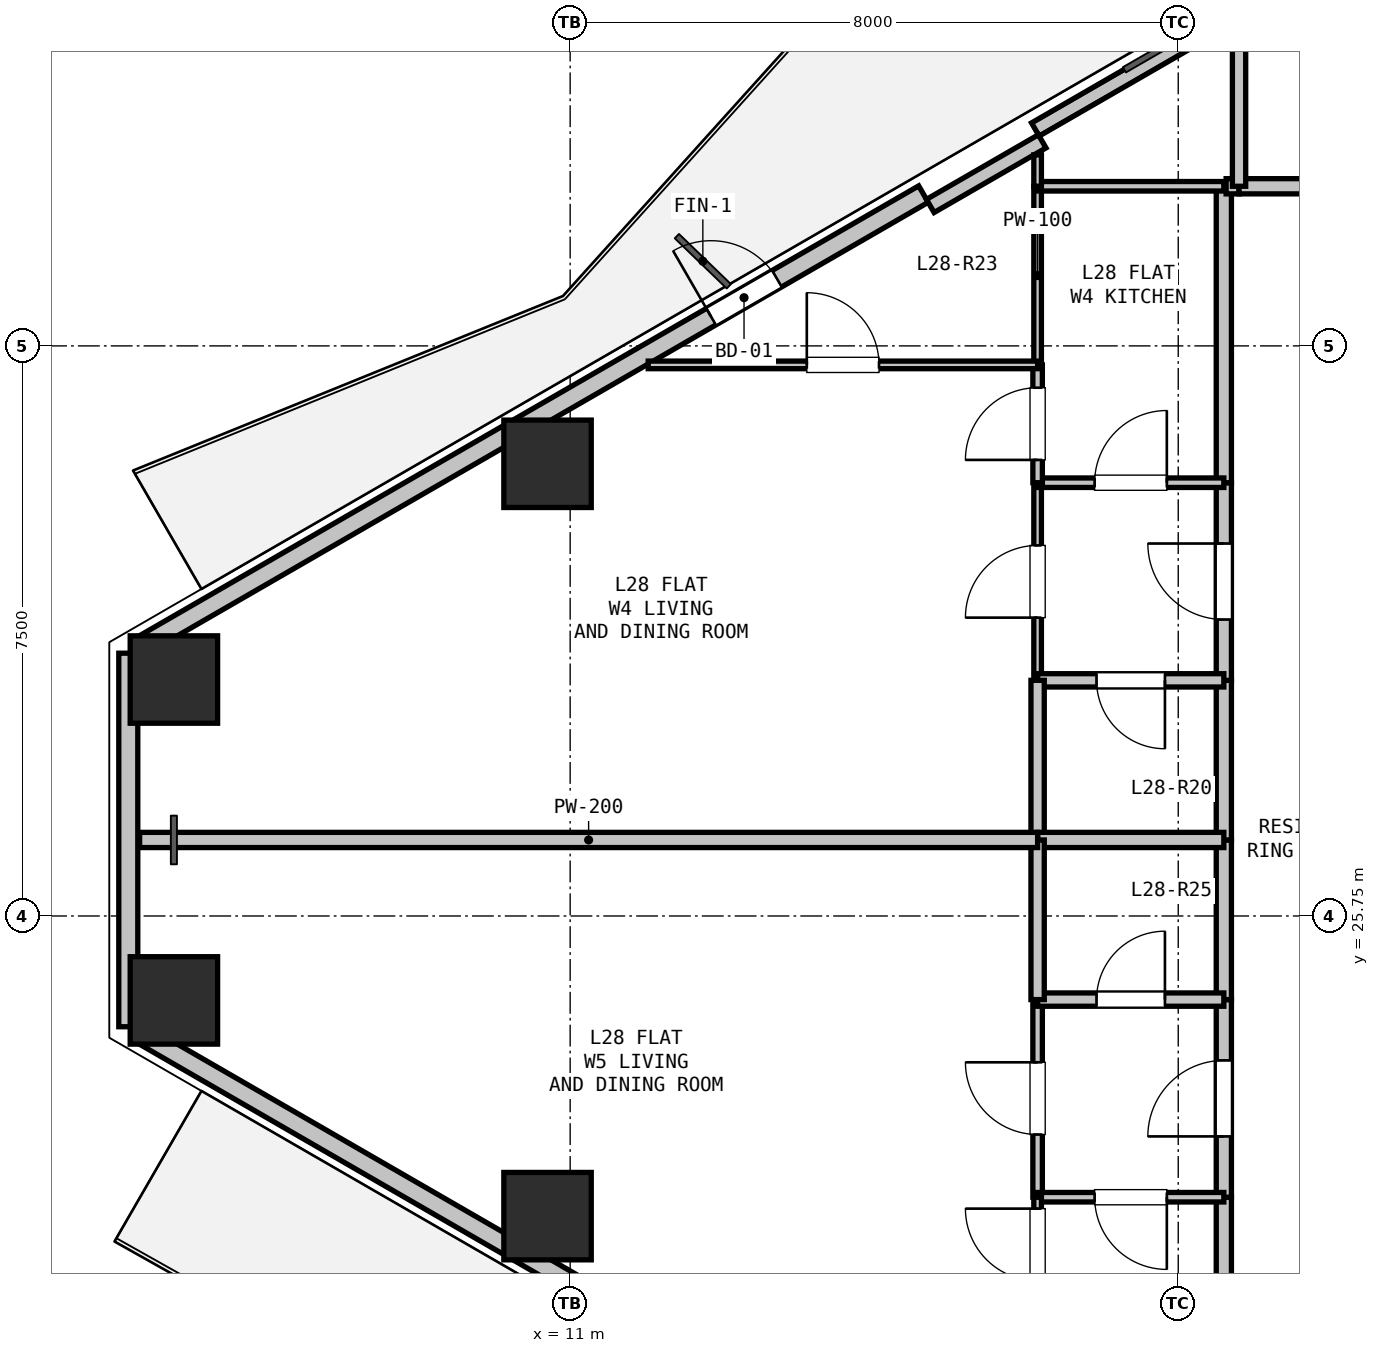
"""IFC4 building model, lengths in metres.
Left out: names, types, materials, properties, quantities, classifications, styles, units other than length and angle.
Written with IfcOpenShell. Run it as: python <this file> out.ifc"""

import sys

from ifc_helpers import new_model, si_unit, direction, frame, frame_2d, origin, origin_2d, place, context, subcontext, project, spatial, rectangle, hollow_rectangle, extrude, element, fill, save


model = new_model("IFC4")
c1 = context("Model", 3, precision=1e-05, world=origin(), true_north=direction((0.0, 1.0)))
c2 = subcontext(c1, "Body", "Model", "MODEL_VIEW")
j1 = project(units=[si_unit("LENGTHUNIT", "METRE"), si_unit("PLANEANGLEUNIT", "RADIAN")], contexts=[c1])
p1 = place(None, origin())
s1 = spatial("IfcSite", under=j1, at=p1, CompositionType="ELEMENT")
p2 = place(p1, origin())
s2 = spatial("IfcBuilding", under=s1, at=p2, CompositionType="ELEMENT")
p3 = place(p2, frame((0.0, 0.0, 103.2)))
s3 = spatial("IfcBuildingStorey", under=s2, at=p3, CompositionType="ELEMENT", Elevation=103.2)
for number, where, z_axis, x_axis in (
    (1, (5.787, 28.861, 0.0), (0.0, 0.0, 1.0), (1.0, 0.0, 0.0)),
    (2, (10.702, 31.699, 0.0), (0.0, 0.0, 1.0), (1.0, 0.0, 0.0)),
    (3, (10.702, 21.801, 0.0), (0.0, 0.0, 1.0), (1.0, 0.0, 0.0)),
    (4, (5.787, 24.639, 0.0), (0.0, 0.0, 1.0), (1.0, 0.0, 0.0)),
):
    element("IfcColumn", number, at=place(p3, frame(where, z_axis=z_axis, x_axis=x_axis)), inside=s3, PredefinedType="COLUMN", context=c2, shape_type="SweptSolid", body=[
        extrude(hollow_rectangle(XDim=1.15, YDim=1.15, WallThickness=0.032, at=origin_2d()), origin(), (0.0, 0.0, 1.0), 3.3),
    ])
p4 = place(p3, frame((5.187, 24.293, 0.0), z_axis=(0.0, 0.0, 1.0), x_axis=(0.0, 1.0, 0.0)))
e5 = element("IfcWall", 5, at=p4, inside=s3, PredefinedType="SOLIDWALL", context=c2, shape_type="SweptSolid", body=[
    extrude(rectangle(XDim=4.915, YDim=0.25, at=frame_2d((2.457, 0.0))), origin(), (0.0, 0.0, 1.0), 2.67),
])
p5 = place(p3, frame((5.317, 29.282, 0.0), z_axis=(0.0, 0.0, 1.0), x_axis=(0.866023023012, 0.500004123596, 0.0)))
e6 = element("IfcWall", 6, at=p5, inside=s3, PredefinedType="SOLIDWALL", context=c2, shape_type="SweptSolid", body=[
    extrude(rectangle(XDim=11.93, YDim=0.25, at=frame_2d((5.965, 0.0))), origin(), (0.0, 0.0, 1.0), 2.67),
])
p6 = place(p5, frame((8.704, 0.0, 0.0)))
e7 = element("IfcOpeningElement", 7, at=p6, cuts=e6, PredefinedType="OPENING", context=c2, shape_type="SweptSolid", body=[
    extrude(rectangle(XDim=1.0, YDim=2.1, at=frame_2d((0.5, 1.05))), frame((0.0, 0.135, 0.0), z_axis=(0.0, -1.0, 0.0), x_axis=(1.0, 0.0, 0.0)), (0.0, 0.0, 1.0), 0.27),
])
p7 = place(p3, frame((17.12, 36.097, 0.0), z_axis=(0.0, 0.0, 1.0), x_axis=(0.866027010039, 0.499997217876, 0.0)))
e8 = element("IfcWall", 8, at=p7, inside=s3, PredefinedType="PARAPET", context=c2, shape_type="SweptSolid", body=[
    extrude(rectangle(XDim=11.229, YDim=0.2, at=frame_2d((5.615, 0.0))), origin(), (0.0, 0.0, 1.0), 0.2),
])
p8 = place(p3, frame((15.738, 35.091, 0.0), z_axis=(0.0, 0.0, 1.0), x_axis=(0.866025371046, 0.500000056704, 0.0)))
e9 = element("IfcWall", 9, at=p8, inside=s3, PredefinedType="PARAPET", context=c2, shape_type="SweptSolid", body=[
    extrude(rectangle(XDim=1.7, YDim=0.2, at=frame_2d((0.85, 0.0))), origin(), (0.0, 0.0, 1.0), 2.67),
])
p9 = place(p3, frame((15.648, 18.253, 0.0), z_axis=(0.0, 0.0, 1.0), x_axis=(-0.866023023012, 0.500004123596, 0.0)))
e10 = element("IfcWall", 10, at=p9, inside=s3, PredefinedType="SOLIDWALL", context=c2, shape_type="SweptSolid", body=[
    extrude(rectangle(XDim=11.93, YDim=0.25, at=frame_2d((5.965, 0.0))), origin(), (0.0, 0.0, 1.0), 2.67),
])
p10 = place(p9, frame((1.706, 0.0, 0.9)))
e11 = element("IfcOpeningElement", 11, at=p10, cuts=e10, PredefinedType="OPENING", context=c2, shape_type="SweptSolid", body=[
    extrude(rectangle(XDim=1.2, YDim=1.4, at=frame_2d((0.6, 0.7))), frame((0.0, 0.135, 0.0), z_axis=(0.0, -1.0, 0.0), x_axis=(1.0, 0.0, 0.0)), (0.0, 0.0, 1.0), 0.27),
])
p11 = place(p3, frame((19.6, 18.15, 0.0), z_axis=(0.0, 0.0, 1.0), x_axis=(0.0, 1.0, 0.0)))
e12 = element("IfcWall", 12, at=p11, inside=s3, PredefinedType="PARTITIONING", context=c2, shape_type="SweptSolid", body=[
    extrude(rectangle(XDim=3.9, YDim=0.2, at=frame_2d((1.95, 0.0))), origin(), (0.0, 0.0, 1.0), 2.423),
])
p12 = place(p3, frame((19.6, 22.05, 0.0), z_axis=(0.0, 0.0, 1.0), x_axis=(0.0, 1.0, 0.0)))
e13 = element("IfcWall", 13, at=p12, inside=s3, PredefinedType="PARTITIONING", context=c2, shape_type="SweptSolid", body=[
    extrude(rectangle(XDim=2.6, YDim=0.2, at=frame_2d((1.3, 0.0))), origin(), (0.0, 0.0, 1.0), 3.05),
])
p13 = place(p12, frame((0.8, 0.0, 0.0)))
e14 = element("IfcOpeningElement", 14, at=p13, cuts=e13, PredefinedType="OPENING", context=c2, shape_type="SweptSolid", body=[
    extrude(rectangle(XDim=1.0, YDim=2.15, at=frame_2d((0.5, 1.075))), frame((0.0, 0.11, 0.0), z_axis=(0.0, -1.0, 0.0), x_axis=(1.0, 0.0, 0.0)), (0.0, 0.0, 1.0), 0.22),
])
for number, where, z_axis, x_axis in (
    (15, (19.6, 24.65, 0.0), (0.0, 0.0, 1.0), (0.0, 1.0, 0.0)),
    (16, (19.6, 26.75, 0.0), (0.0, 0.0, 1.0), (0.0, 1.0, 0.0)),
):
    element("IfcWall", number, at=place(p3, frame(where, z_axis=z_axis, x_axis=x_axis)), inside=s3, PredefinedType="PARTITIONING", context=c2, shape_type="SweptSolid", body=[
        extrude(rectangle(XDim=2.1, YDim=0.2, at=frame_2d((1.05, 0.0))), origin(), (0.0, 0.0, 1.0), 3.05),
    ])
p14 = place(p3, frame((19.6, 28.85, 0.0), z_axis=(0.0, 0.0, 1.0), x_axis=(0.0, 1.0, 0.0)))
e17 = element("IfcWall", 17, at=p14, inside=s3, PredefinedType="PARTITIONING", context=c2, shape_type="SweptSolid", body=[
    extrude(rectangle(XDim=2.6, YDim=0.2, at=frame_2d((1.3, 0.0))), origin(), (0.0, 0.0, 1.0), 3.05),
])
p15 = place(p14, frame((0.8, 0.0, 0.0)))
e18 = element("IfcOpeningElement", 18, at=p15, cuts=e17, PredefinedType="OPENING", context=c2, shape_type="SweptSolid", body=[
    extrude(rectangle(XDim=1.0, YDim=2.15, at=frame_2d((0.5, 1.075))), frame((0.0, 0.11, 0.0), z_axis=(0.0, -1.0, 0.0), x_axis=(1.0, 0.0, 0.0)), (0.0, 0.0, 1.0), 0.22),
])
p16 = place(p3, frame((19.6, 31.45, 0.0), z_axis=(0.0, 0.0, 1.0), x_axis=(0.0, 1.0, 0.0)))
e19 = element("IfcWall", 19, at=p16, inside=s3, PredefinedType="PARTITIONING", context=c2, shape_type="SweptSolid", body=[
    extrude(rectangle(XDim=3.9, YDim=0.2, at=frame_2d((1.95, 0.0))), origin(), (0.0, 0.0, 1.0), 2.423),
])
p17 = place(p3, frame((19.63, 35.35, 0.0), z_axis=(0.0, 0.0, 1.0), x_axis=(1.0, 0.0, 0.0)))
e20 = element("IfcWall", 20, at=p17, inside=s3, PredefinedType="PARTITIONING", context=c2, shape_type="SweptSolid", body=[
    extrude(rectangle(XDim=0.17, YDim=0.2, at=frame_2d((0.085, 0.0))), origin(), (0.0, 0.0, 1.0), 3.05),
])
p18 = place(p3, frame((19.8, 35.35, 0.0), z_axis=(0.0, 0.0, 1.0), x_axis=(1.0, 0.0, 0.0)))
e21 = element("IfcWall", 21, at=p18, inside=s3, PredefinedType="PARTITIONING", context=c2, shape_type="SweptSolid", body=[
    extrude(rectangle(XDim=2.0, YDim=0.2, at=frame_2d((1.0, 0.0))), origin(), (0.0, 0.0, 1.0), 3.05),
])
p19 = place(p3, frame((17.15, 28.85, 0.0), z_axis=(0.0, 0.0, 1.0), x_axis=(0.0, 1.0, 0.0)))
e22 = element("IfcWall", 22, at=p19, inside=s3, PredefinedType="PARTITIONING", context=c2, shape_type="SweptSolid", body=[
    extrude(rectangle(XDim=2.6, YDim=0.1, at=frame_2d((1.3, 0.0))), origin(), (0.0, 0.0, 1.0), 3.05),
])
p20 = place(p19, frame((0.825, 0.0, 0.0)))
e23 = element("IfcOpeningElement", 23, at=p20, cuts=e22, PredefinedType="OPENING", context=c2, shape_type="SweptSolid", body=[
    extrude(rectangle(XDim=0.95, YDim=2.1, at=frame_2d((0.475, 1.05))), frame((0.0, 0.06, 0.0), z_axis=(0.0, -1.0, 0.0), x_axis=(1.0, 0.0, 0.0)), (0.0, 0.0, 1.0), 0.12),
])
p21 = place(p3, frame((17.15, 31.45, 0.0), z_axis=(0.0, 0.0, 1.0), x_axis=(1.0, 0.0, 0.0)))
e24 = element("IfcWall", 24, at=p21, inside=s3, PredefinedType="PARTITIONING", context=c2, shape_type="SweptSolid", body=[
    extrude(rectangle(XDim=2.45, YDim=0.125, at=frame_2d((1.225, 0.0))), origin(), (0.0, 0.0, 1.0), 3.05),
])
p22 = place(p21, frame((0.75, 0.0, 0.0)))
e25 = element("IfcOpeningElement", 25, at=p22, cuts=e24, PredefinedType="OPENING", context=c2, shape_type="SweptSolid", body=[
    extrude(rectangle(XDim=0.95, YDim=2.1, at=frame_2d((0.475, 1.05))), frame((0.0, 0.073, 0.0), z_axis=(0.0, -1.0, 0.0), x_axis=(1.0, 0.0, 0.0)), (0.0, 0.0, 1.0), 0.145),
])
p23 = place(p3, frame((19.6, 28.85, 0.0), z_axis=(0.0, 0.0, 1.0), x_axis=(-1.0, 0.0, 0.0)))
e26 = element("IfcWall", 26, at=p23, inside=s3, PredefinedType="PLUMBINGWALL", context=c2, shape_type="SweptSolid", body=[
    extrude(rectangle(XDim=2.45, YDim=0.175, at=frame_2d((1.225, 0.0))), origin(), (0.0, 0.0, 1.0), 3.05),
])
p24 = place(p23, frame((0.775, 0.0, 0.0)))
e27 = element("IfcOpeningElement", 27, at=p24, cuts=e26, PredefinedType="OPENING", context=c2, shape_type="SweptSolid", body=[
    extrude(rectangle(XDim=0.9, YDim=2.1, at=frame_2d((0.45, 1.05))), frame((0.0, 0.097, 0.0), z_axis=(0.0, -1.0, 0.0), x_axis=(1.0, 0.0, 0.0)), (0.0, 0.0, 1.0), 0.195),
])
p25 = place(p3, frame((17.15, 22.05, 0.0), z_axis=(0.0, 0.0, 1.0), x_axis=(0.0, 1.0, 0.0)))
e28 = element("IfcWall", 28, at=p25, inside=s3, PredefinedType="PARTITIONING", context=c2, shape_type="SweptSolid", body=[
    extrude(rectangle(XDim=2.6, YDim=0.125, at=frame_2d((1.3, 0.0))), origin(), (0.0, 0.0, 1.0), 3.05),
])
p26 = place(p25, frame((0.825, 0.0, 0.0)))
e29 = element("IfcOpeningElement", 29, at=p26, cuts=e28, PredefinedType="OPENING", context=c2, shape_type="SweptSolid", body=[
    extrude(rectangle(XDim=0.95, YDim=2.1, at=frame_2d((0.475, 1.05))), frame((0.0, 0.073, 0.0), z_axis=(0.0, -1.0, 0.0), x_axis=(1.0, 0.0, 0.0)), (0.0, 0.0, 1.0), 0.145),
])
p27 = place(p3, frame((17.15, 24.65, 0.0), z_axis=(0.0, 0.0, 1.0), x_axis=(1.0, 0.0, 0.0)))
e30 = element("IfcWall", 30, at=p27, inside=s3, PredefinedType="PLUMBINGWALL", context=c2, shape_type="SweptSolid", body=[
    extrude(rectangle(XDim=2.45, YDim=0.175, at=frame_2d((1.225, 0.0))), origin(), (0.0, 0.0, 1.0), 3.05),
])
p28 = place(p27, frame((0.775, 0.0, 0.0)))
e31 = element("IfcOpeningElement", 31, at=p28, cuts=e30, PredefinedType="OPENING", context=c2, shape_type="SweptSolid", body=[
    extrude(rectangle(XDim=0.9, YDim=2.1, at=frame_2d((0.45, 1.05))), frame((0.0, 0.097, 0.0), z_axis=(0.0, -1.0, 0.0), x_axis=(1.0, 0.0, 0.0)), (0.0, 0.0, 1.0), 0.195),
])
p29 = place(p3, frame((19.6, 22.05, 0.0), z_axis=(0.0, 0.0, 1.0), x_axis=(-1.0, 0.0, 0.0)))
e32 = element("IfcWall", 32, at=p29, inside=s3, PredefinedType="PARTITIONING", context=c2, shape_type="SweptSolid", body=[
    extrude(rectangle(XDim=2.45, YDim=0.125, at=frame_2d((1.225, 0.0))), origin(), (0.0, 0.0, 1.0), 3.05),
])
p30 = place(p29, frame((0.75, 0.0, 0.0)))
e33 = element("IfcOpeningElement", 33, at=p30, cuts=e32, PredefinedType="OPENING", context=c2, shape_type="SweptSolid", body=[
    extrude(rectangle(XDim=0.95, YDim=2.1, at=frame_2d((0.475, 1.05))), frame((0.0, 0.073, 0.0), z_axis=(0.0, -1.0, 0.0), x_axis=(1.0, 0.0, 0.0)), (0.0, 0.0, 1.0), 0.145),
])
p31 = place(p3, frame((19.8, 35.35, 0.0), z_axis=(0.0, 0.0, 1.0), x_axis=(0.0, 1.0, 0.0)))
e34 = element("IfcWall", 34, at=p31, inside=s3, PredefinedType="PLUMBINGWALL", context=c2, shape_type="SweptSolid", body=[
    extrude(rectangle(XDim=2.252, YDim=0.175, at=frame_2d((1.126, 0.0))), origin(), (0.0, 0.0, 1.0), 2.365),
])
p32 = place(p3, frame((17.15, 26.75, 0.0), z_axis=(0.0, 0.0, 1.0), x_axis=(0.0, 1.0, 0.0)))
e35 = element("IfcWall", 35, at=p32, inside=s3, PredefinedType="PLUMBINGWALL", context=c2, shape_type="SweptSolid", body=[
    extrude(rectangle(XDim=2.1, YDim=0.175, at=frame_2d((1.05, 0.0))), origin(), (0.0, 0.0, 1.0), 3.05),
])
p33 = place(p3, frame((19.6, 26.75, 0.0), z_axis=(0.0, 0.0, 1.0), x_axis=(-1.0, 0.0, 0.0)))
e36 = element("IfcWall", 36, at=p33, inside=s3, PredefinedType="PARTITIONING", context=c2, shape_type="SweptSolid", body=[
    extrude(rectangle(XDim=2.45, YDim=0.2, at=frame_2d((1.225, 0.0))), origin(), (0.0, 0.0, 1.0), 3.05),
])
p34 = place(p3, frame((17.15, 31.45, 0.0), z_axis=(0.0, 0.0, 1.0), x_axis=(0.0, 1.0, 0.0)))
e37 = element("IfcWall", 37, at=p34, inside=s3, PredefinedType="PARTITIONING", context=c2, shape_type="SweptSolid", body=[
    extrude(rectangle(XDim=1.55, YDim=0.125, at=frame_2d((0.775, 0.0))), origin(), (0.0, 0.0, 1.0), 2.423),
])
p35 = place(p34, frame((0.3, 0.0, 0.0)))
e38 = element("IfcOpeningElement", 38, at=p35, cuts=e37, PredefinedType="OPENING", context=c2, shape_type="SweptSolid", body=[
    extrude(rectangle(XDim=0.95, YDim=2.1, at=frame_2d((0.475, 1.05))), frame((0.0, 0.073, 0.0), z_axis=(0.0, -1.0, 0.0), x_axis=(1.0, 0.0, 0.0)), (0.0, 0.0, 1.0), 0.145),
])
p36 = place(p3, frame((17.15, 33.0, 0.0), z_axis=(0.0, 0.0, 1.0), x_axis=(0.0, 1.0, 0.0)))
e39 = element("IfcWall", 39, at=p36, inside=s3, PredefinedType="PARTITIONING", context=c2, shape_type="SweptSolid", body=[
    extrude(rectangle(XDim=2.35, YDim=0.1, at=frame_2d((1.175, 0.0))), origin(), (0.0, 0.0, 1.0), 2.365),
])
p37 = place(p3, frame((17.15, 35.35, 0.0), z_axis=(0.0, 0.0, 1.0), x_axis=(1.0, 0.0, 0.0)))
e40 = element("IfcWall", 40, at=p37, inside=s3, PredefinedType="PARTITIONING", context=c2, shape_type="SweptSolid", body=[
    extrude(rectangle(XDim=2.45, YDim=0.125, at=frame_2d((1.225, 0.0))), origin(), (0.0, 0.0, 1.0), 2.365),
])
p38 = place(p3, frame((17.15, 24.65, 0.0), z_axis=(0.0, 0.0, 1.0), x_axis=(0.0, 1.0, 0.0)))
e41 = element("IfcWall", 41, at=p38, inside=s3, PredefinedType="PLUMBINGWALL", context=c2, shape_type="SweptSolid", body=[
    extrude(rectangle(XDim=2.1, YDim=0.175, at=frame_2d((1.05, 0.0))), origin(), (0.0, 0.0, 1.0), 3.05),
])
p39 = place(p3, frame((17.15, 20.8, 0.0), z_axis=(0.0, 0.0, 1.0), x_axis=(0.0, 1.0, 0.0)))
e42 = element("IfcWall", 42, at=p39, inside=s3, PredefinedType="PARTITIONING", context=c2, shape_type="SweptSolid", body=[
    extrude(rectangle(XDim=1.25, YDim=0.1, at=frame_2d((0.625, 0.0))), origin(), (0.0, 0.0, 1.0), 2.423),
])
p40 = place(p39, frame((0.15, 0.0, 0.0)))
e43 = element("IfcOpeningElement", 43, at=p40, cuts=e42, PredefinedType="OPENING", context=c2, shape_type="SweptSolid", body=[
    extrude(rectangle(XDim=0.95, YDim=2.1, at=frame_2d((0.475, 1.05))), frame((0.0, 0.06, 0.0), z_axis=(0.0, -1.0, 0.0), x_axis=(1.0, 0.0, 0.0)), (0.0, 0.0, 1.0), 0.12),
])
p41 = place(p3, frame((12.027, 33.0, 0.0), z_axis=(0.0, 0.0, 1.0), x_axis=(1.0, 0.0, 0.0)))
e44 = element("IfcWall", 44, at=p41, inside=s3, PredefinedType="PARTITIONING", context=c2, shape_type="SweptSolid", body=[
    extrude(rectangle(XDim=5.123, YDim=0.1, at=frame_2d((2.562, 0.0))), origin(), (0.0, 0.0, 1.0), 2.365),
])
p42 = place(p41, frame((2.086, 0.0, 0.0)))
e45 = element("IfcOpeningElement", 45, at=p42, cuts=e44, PredefinedType="OPENING", context=c2, shape_type="SweptSolid", body=[
    extrude(rectangle(XDim=0.95, YDim=2.1, at=frame_2d((0.475, 1.05))), frame((0.0, 0.06, 0.0), z_axis=(0.0, -1.0, 0.0), x_axis=(1.0, 0.0, 0.0)), (0.0, 0.0, 1.0), 0.12),
])
p43 = place(p3, frame((17.15, 26.75, 0.0), z_axis=(0.0, 0.0, 1.0), x_axis=(-1.0, 0.0, 0.0)))
e46 = element("IfcWall", 46, at=p43, inside=s3, PredefinedType="PARTITIONING", context=c2, shape_type="SweptSolid", body=[
    extrude(rectangle(XDim=11.814, YDim=0.2, at=frame_2d((5.907, 0.0))), origin(), (0.0, 0.0, 1.0), 2.715),
])
p44 = place(p3, frame((17.15, 35.763, 0.0), z_axis=(0.0, 0.0, 1.0), x_axis=(0.0, -1.0, 0.0)))
e47 = element("IfcWall", 47, at=p44, inside=s3, PredefinedType="PARTITIONING", context=c2, shape_type="SweptSolid", body=[
    extrude(rectangle(XDim=0.413, YDim=0.1, at=frame_2d((0.207, 0.0))), origin(), (0.0, 0.0, 1.0), 2.365),
])
p45 = place(p6, origin())
e48 = element("IfcDoor", 48, at=p45, inside=s3, OperationType="SINGLE_SWING_LEFT", PredefinedType="DOOR", context=c2, shape_type="SweptSolid", body=[
    extrude(rectangle(XDim=1.0, YDim=2.1, at=frame_2d((0.5, 1.05))), frame((0.0, 0.025, 0.0), z_axis=(0.0, -1.0, 0.0), x_axis=(1.0, 0.0, 0.0)), (0.0, 0.0, 1.0), 0.05),
])
fill(e7, e48)
p46 = place(p15, origin())
e49 = element("IfcDoor", 49, at=p46, inside=s3, OperationType="SINGLE_SWING_RIGHT", PredefinedType="DOOR", context=c2, shape_type="SweptSolid", body=[
    extrude(rectangle(XDim=1.0, YDim=2.15, at=frame_2d((0.5, 1.075))), frame((0.0, 0.025, 0.0), z_axis=(0.0, -1.0, 0.0), x_axis=(1.0, 0.0, 0.0)), (0.0, 0.0, 1.0), 0.05),
])
fill(e18, e49)
p47 = place(p13, origin())
e50 = element("IfcDoor", 50, at=p47, inside=s3, OperationType="SINGLE_SWING_LEFT", PredefinedType="DOOR", context=c2, shape_type="SweptSolid", body=[
    extrude(rectangle(XDim=1.0, YDim=2.15, at=frame_2d((0.5, 1.075))), frame((0.0, 0.025, 0.0), z_axis=(0.0, -1.0, 0.0), x_axis=(1.0, 0.0, 0.0)), (0.0, 0.0, 1.0), 0.05),
])
fill(e14, e50)
p48 = place(p24, origin())
e51 = element("IfcDoor", 51, at=p48, inside=s3, OperationType="SINGLE_SWING_LEFT", PredefinedType="DOOR", context=c2, shape_type="SweptSolid", body=[
    extrude(rectangle(XDim=0.9, YDim=2.1, at=frame_2d((0.45, 1.05))), frame((0.0, 0.025, 0.0), z_axis=(0.0, -1.0, 0.0), x_axis=(1.0, 0.0, 0.0)), (0.0, 0.0, 1.0), 0.05),
])
fill(e27, e51)
p49 = place(p22, origin())
e52 = element("IfcDoor", 52, at=p49, inside=s3, OperationType="SINGLE_SWING_RIGHT", PredefinedType="DOOR", context=c2, shape_type="SweptSolid", body=[
    extrude(rectangle(XDim=0.95, YDim=2.1, at=frame_2d((0.475, 1.05))), frame((0.0, 0.025, 0.0), z_axis=(0.0, -1.0, 0.0), x_axis=(1.0, 0.0, 0.0)), (0.0, 0.0, 1.0), 0.05),
])
fill(e25, e52)
p50 = place(p20, origin())
e53 = element("IfcDoor", 53, at=p50, inside=s3, OperationType="SINGLE_SWING_LEFT", PredefinedType="DOOR", context=c2, shape_type="SweptSolid", body=[
    extrude(rectangle(XDim=0.95, YDim=2.1, at=frame_2d((0.475, 1.05))), frame((0.0, 0.025, 0.0), z_axis=(0.0, -1.0, 0.0), x_axis=(1.0, 0.0, 0.0)), (0.0, 0.0, 1.0), 0.05),
])
fill(e23, e53)
p51 = place(p28, origin())
e54 = element("IfcDoor", 54, at=p51, inside=s3, OperationType="SINGLE_SWING_RIGHT", PredefinedType="DOOR", context=c2, shape_type="SweptSolid", body=[
    extrude(rectangle(XDim=0.9, YDim=2.1, at=frame_2d((0.45, 1.05))), frame((0.0, 0.025, 0.0), z_axis=(0.0, -1.0, 0.0), x_axis=(1.0, 0.0, 0.0)), (0.0, 0.0, 1.0), 0.05),
])
fill(e31, e54)
p52 = place(p30, origin())
e55 = element("IfcDoor", 55, at=p52, inside=s3, OperationType="SINGLE_SWING_LEFT", PredefinedType="DOOR", context=c2, shape_type="SweptSolid", body=[
    extrude(rectangle(XDim=0.95, YDim=2.1, at=frame_2d((0.475, 1.05))), frame((0.0, 0.025, 0.0), z_axis=(0.0, -1.0, 0.0), x_axis=(1.0, 0.0, 0.0)), (0.0, 0.0, 1.0), 0.05),
])
fill(e33, e55)
p53 = place(p26, origin())
e56 = element("IfcDoor", 56, at=p53, inside=s3, OperationType="SINGLE_SWING_RIGHT", PredefinedType="DOOR", context=c2, shape_type="SweptSolid", body=[
    extrude(rectangle(XDim=0.95, YDim=2.1, at=frame_2d((0.475, 1.05))), frame((0.0, 0.025, 0.0), z_axis=(0.0, -1.0, 0.0), x_axis=(1.0, 0.0, 0.0)), (0.0, 0.0, 1.0), 0.05),
])
fill(e29, e56)
p54 = place(p35, origin())
e57 = element("IfcDoor", 57, at=p54, inside=s3, OperationType="SINGLE_SWING_LEFT", PredefinedType="DOOR", context=c2, shape_type="SweptSolid", body=[
    extrude(rectangle(XDim=0.95, YDim=2.1, at=frame_2d((0.475, 1.05))), frame((0.0, 0.025, 0.0), z_axis=(0.0, -1.0, 0.0), x_axis=(1.0, 0.0, 0.0)), (0.0, 0.0, 1.0), 0.05),
])
fill(e38, e57)
p55 = place(p40, origin())
e58 = element("IfcDoor", 58, at=p55, inside=s3, OperationType="SINGLE_SWING_RIGHT", PredefinedType="DOOR", context=c2, shape_type="SweptSolid", body=[
    extrude(rectangle(XDim=0.95, YDim=2.1, at=frame_2d((0.475, 1.05))), frame((0.0, 0.025, 0.0), z_axis=(0.0, -1.0, 0.0), x_axis=(1.0, 0.0, 0.0)), (0.0, 0.0, 1.0), 0.05),
])
fill(e43, e58)
p56 = place(p42, origin())
e59 = element("IfcDoor", 59, at=p56, inside=s3, OperationType="SINGLE_SWING_LEFT", PredefinedType="DOOR", context=c2, shape_type="SweptSolid", body=[
    extrude(rectangle(XDim=0.95, YDim=2.1, at=frame_2d((0.475, 1.05))), frame((0.0, 0.025, 0.0), z_axis=(0.0, -1.0, 0.0), x_axis=(1.0, 0.0, 0.0)), (0.0, 0.0, 1.0), 0.05),
])
fill(e45, e59)
save(model, sys.argv[1])
